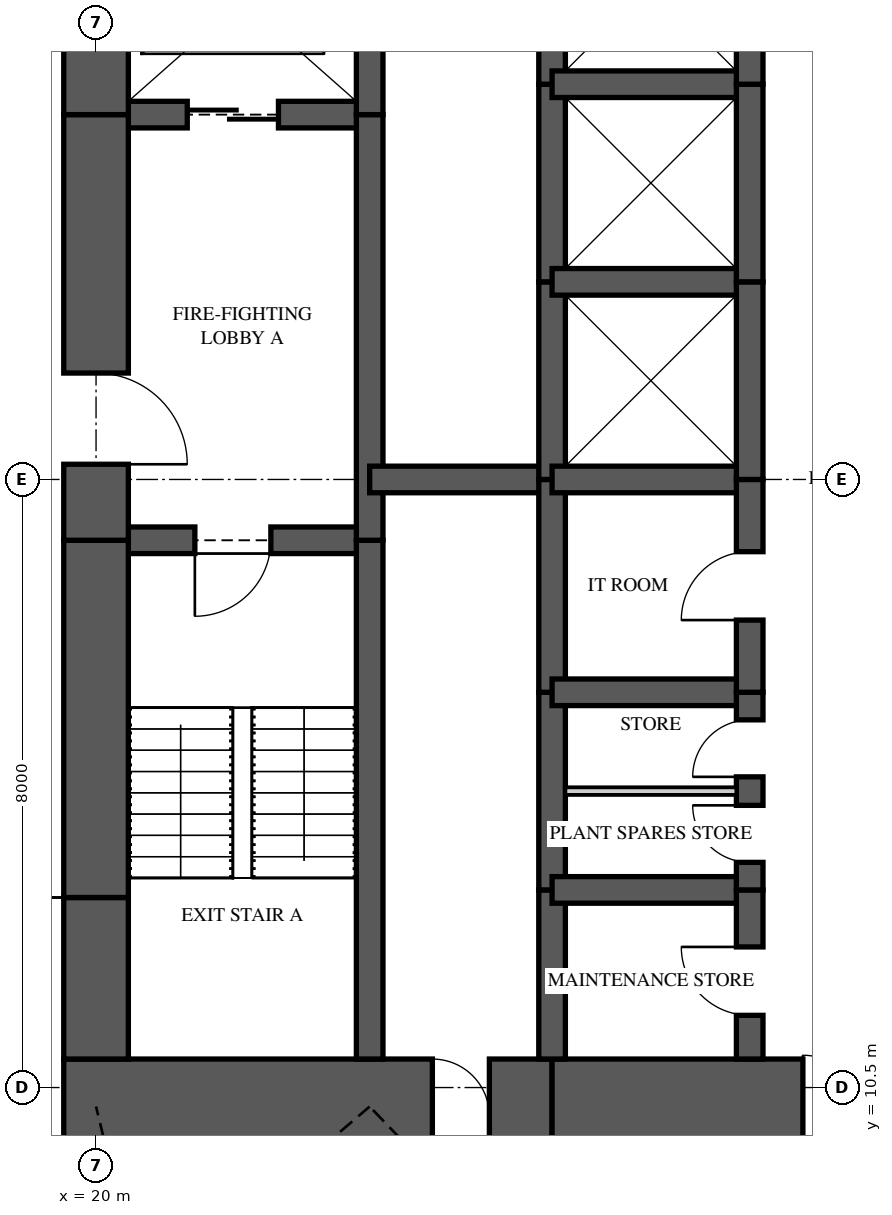
"""IFC4 building model, lengths in metres.
Left out: names, types, materials, properties, quantities, classifications, styles, units other than length and angle.
Written with IfcOpenShell. Run it as: python <this file> out.ifc"""

import sys

from ifc_helpers import new_model, si_unit, direction, frame, frame_2d, origin, place, context, subcontext, project, spatial, rectangle, extrude, element, fill, save


model = new_model("IFC4")
c1 = context("Model", 3, precision=1e-05, world=origin(), true_north=direction((0.0, 1.0)))
c2 = subcontext(c1, "Body", "Model", "MODEL_VIEW")
j1 = project(units=[si_unit("LENGTHUNIT", "METRE"), si_unit("PLANEANGLEUNIT", "RADIAN")], contexts=[c1])
p1 = place(None, origin())
s1 = spatial("IfcSite", under=j1, at=p1, CompositionType="ELEMENT")
p2 = place(p1, origin())
s2 = spatial("IfcBuilding", under=s1, at=p2, CompositionType="ELEMENT")
p3 = place(p2, frame((0.0, 0.0, 149.35)))
s3 = spatial("IfcBuildingStorey", under=s2, at=p3, CompositionType="ELEMENT", Elevation=149.35)
p4 = place(p3, frame((19.575, 10.125, 0.0), z_axis=(0.0, 0.0, 1.0), x_axis=(1.0, 0.0, 0.0)))
e1 = element("IfcWall", 1, at=p4, inside=s3, PredefinedType="SHEAR", context=c2, shape_type="SweptSolid", body=[
    extrude(rectangle(XDim=6.425, YDim=1.5, at=frame_2d((3.212, 0.0))), origin(), (0.0, 0.0, 1.0), 5.0),
])
p5 = place(p4, frame((4.85, 0.0, 0.0)))
e2 = element("IfcOpeningElement", 2, at=p5, cuts=e1, PredefinedType="OPENING", context=c2, shape_type="SweptSolid", body=[
    extrude(rectangle(XDim=0.75, YDim=2.1, at=frame_2d((0.375, 1.05))), frame((0.0, 0.76, 0.0), z_axis=(0.0, -1.0, 0.0), x_axis=(1.0, 0.0, 0.0)), (0.0, 0.0, 1.0), 1.52),
])
p6 = place(p3, frame((26.0, 10.125, 0.0), z_axis=(0.0, 0.0, 1.0), x_axis=(1.0, 0.0, 0.0)))
e3 = element("IfcWall", 3, at=p6, inside=s3, PredefinedType="SHEAR", context=c2, shape_type="SweptSolid", body=[
    extrude(rectangle(XDim=5.6, YDim=1.5, at=frame_2d((2.8, 0.0))), origin(), (0.0, 0.0, 1.0), 5.0),
])
p7 = place(p6, frame((3.3, 0.0, 0.0)))
e4 = element("IfcOpeningElement", 4, at=p7, cuts=e3, PredefinedType="OPENING", context=c2, shape_type="SweptSolid", body=[
    extrude(rectangle(XDim=1.6, YDim=2.1, at=frame_2d((0.8, 1.05))), frame((0.0, 0.76, 0.0), z_axis=(0.0, -1.0, 0.0), x_axis=(1.0, 0.0, 0.0)), (0.0, 0.0, 1.0), 1.52),
])
p8 = place(p3, frame((20.0, 26.125, 0.0), z_axis=(0.0, 0.0, 1.0), x_axis=(0.0, -1.0, 0.0)))
e5 = element("IfcWall", 5, at=p8, inside=s3, PredefinedType="SHEAR", context=c2, shape_type="SweptSolid", body=[
    extrude(rectangle(XDim=2.825, YDim=0.85, at=frame_2d((1.413, 0.0))), origin(), (0.0, 0.0, 1.0), 5.0),
])
p9 = place(p3, frame((20.0, 23.3, 0.0), z_axis=(0.0, 0.0, 1.0), x_axis=(0.0, -1.0, 0.0)))
e6 = element("IfcWall", 6, at=p9, inside=s3, PredefinedType="SHEAR", context=c2, shape_type="SweptSolid", body=[
    extrude(rectangle(XDim=5.6, YDim=0.85, at=frame_2d((2.8, 0.0))), origin(), (0.0, 0.0, 1.0), 5.0),
])
p10 = place(p9, frame((3.4, 0.0, 0.0)))
e7 = element("IfcOpeningElement", 7, at=p10, cuts=e6, PredefinedType="OPENING", context=c2, shape_type="SweptSolid", body=[
    extrude(rectangle(XDim=1.2, YDim=2.2, at=frame_2d((0.6, 1.1))), frame((0.0, 0.435, 0.0), z_axis=(0.0, -1.0, 0.0), x_axis=(1.0, 0.0, 0.0)), (0.0, 0.0, 1.0), 0.87),
])
p11 = place(p3, frame((20.0, 17.7, 0.0), z_axis=(0.0, 0.0, 1.0), x_axis=(0.0, -1.0, 0.0)))
e8 = element("IfcWall", 8, at=p11, inside=s3, PredefinedType="SHEAR", context=c2, shape_type="SweptSolid", body=[
    extrude(rectangle(XDim=4.7, YDim=0.85, at=frame_2d((2.35, 0.0))), origin(), (0.0, 0.0, 1.0), 5.0),
])
p12 = place(p3, frame((20.0, 13.0, 0.0), z_axis=(0.0, 0.0, 1.0), x_axis=(0.0, -1.0, 0.0)))
e9 = element("IfcWall", 9, at=p12, inside=s3, PredefinedType="SHEAR", context=c2, shape_type="SweptSolid", body=[
    extrude(rectangle(XDim=2.125, YDim=0.85, at=frame_2d((1.062, 0.0))), origin(), (0.0, 0.0, 1.0), 5.0),
])
p13 = place(p3, frame((23.6, 10.875, 0.0), z_axis=(0.0, 0.0, 1.0), x_axis=(0.0, 1.0, 0.0)))
e10 = element("IfcWall", 10, at=p13, inside=s3, PredefinedType="SHEAR", context=c2, shape_type="SweptSolid", body=[
    extrude(rectangle(XDim=6.825, YDim=0.35, at=frame_2d((3.413, 0.0))), origin(), (0.0, 0.0, 1.0), 5.0),
])
p14 = place(p3, frame((23.6, 17.7, 0.0), z_axis=(0.0, 0.0, 1.0), x_axis=(0.0, 1.0, 0.0)))
e11 = element("IfcWall", 11, at=p14, inside=s3, PredefinedType="SHEAR", context=c2, shape_type="SweptSolid", body=[
    extrude(rectangle(XDim=5.6, YDim=0.35, at=frame_2d((2.8, 0.0))), origin(), (0.0, 0.0, 1.0), 5.0),
])
p15 = place(p3, frame((23.6, 23.3, 0.0), z_axis=(0.0, 0.0, 1.0), x_axis=(0.0, 1.0, 0.0)))
e12 = element("IfcWall", 12, at=p15, inside=s3, PredefinedType="SHEAR", context=c2, shape_type="SweptSolid", body=[
    extrude(rectangle(XDim=2.825, YDim=0.35, at=frame_2d((1.413, 0.0))), origin(), (0.0, 0.0, 1.0), 5.0),
])
p16 = place(p3, frame((26.0, 10.875, 0.0), z_axis=(0.0, 0.0, 1.0), x_axis=(0.0, 1.0, 0.0)))
e13 = element("IfcWall", 13, at=p16, inside=s3, PredefinedType="SHEAR", context=c2, shape_type="SweptSolid", body=[
    extrude(rectangle(XDim=2.225, YDim=0.35, at=frame_2d((1.113, 0.0))), origin(), (0.0, 0.0, 1.0), 5.0),
])
p17 = place(p3, frame((26.0, 13.1, 0.0), z_axis=(0.0, 0.0, 1.0), x_axis=(0.0, 1.0, 0.0)))
e14 = element("IfcWall", 14, at=p17, inside=s3, PredefinedType="SHEAR", context=c2, shape_type="SweptSolid", body=[
    extrude(rectangle(XDim=2.6, YDim=0.35, at=frame_2d((1.3, 0.0))), origin(), (0.0, 0.0, 1.0), 5.0),
])
p18 = place(p3, frame((26.0, 15.7, 0.0), z_axis=(0.0, 0.0, 1.0), x_axis=(0.0, 1.0, 0.0)))
e15 = element("IfcWall", 15, at=p18, inside=s3, PredefinedType="SHEAR", context=c2, shape_type="SweptSolid", body=[
    extrude(rectangle(XDim=2.8, YDim=0.35, at=frame_2d((1.4, 0.0))), origin(), (0.0, 0.0, 1.0), 5.0),
])
p19 = place(p3, frame((26.0, 18.5, 0.0), z_axis=(0.0, 0.0, 1.0), x_axis=(0.0, 1.0, 0.0)))
e16 = element("IfcWall", 16, at=p19, inside=s3, PredefinedType="SHEAR", context=c2, shape_type="SweptSolid", body=[
    extrude(rectangle(XDim=2.6, YDim=0.35, at=frame_2d((1.3, 0.0))), origin(), (0.0, 0.0, 1.0), 5.0),
])
p20 = place(p3, frame((26.0, 21.1, 0.0), z_axis=(0.0, 0.0, 1.0), x_axis=(0.0, 1.0, 0.0)))
e17 = element("IfcWall", 17, at=p20, inside=s3, PredefinedType="SHEAR", context=c2, shape_type="SweptSolid", body=[
    extrude(rectangle(XDim=2.6, YDim=0.35, at=frame_2d((1.3, 0.0))), origin(), (0.0, 0.0, 1.0), 5.0),
])
p21 = place(p3, frame((26.0, 23.7, 0.0), z_axis=(0.0, 0.0, 1.0), x_axis=(0.0, 1.0, 0.0)))
e18 = element("IfcWall", 18, at=p21, inside=s3, PredefinedType="SHEAR", context=c2, shape_type="SweptSolid", body=[
    extrude(rectangle(XDim=2.425, YDim=0.35, at=frame_2d((1.212, 0.0))), origin(), (0.0, 0.0, 1.0), 5.0),
])
p22 = place(p3, frame((28.6, 10.875, 0.0), z_axis=(0.0, 0.0, 1.0), x_axis=(0.0, 1.0, 0.0)))
e19 = element("IfcWall", 19, at=p22, inside=s3, PredefinedType="SHEAR", context=c2, shape_type="SweptSolid", body=[
    extrude(rectangle(XDim=2.225, YDim=0.35, at=frame_2d((1.113, 0.0))), origin(), (0.0, 0.0, 1.0), 5.0),
])
p23 = place(p22, frame((0.575, 0.0, 0.0)))
e20 = element("IfcOpeningElement", 20, at=p23, cuts=e19, PredefinedType="OPENING", context=c2, shape_type="SweptSolid", body=[
    extrude(rectangle(XDim=0.9, YDim=2.1, at=frame_2d((0.45, 1.05))), frame((0.0, 0.185, 0.0), z_axis=(0.0, -1.0, 0.0), x_axis=(1.0, 0.0, 0.0)), (0.0, 0.0, 1.0), 0.37),
])
p24 = place(p3, frame((28.6, 13.1, 0.0), z_axis=(0.0, 0.0, 1.0), x_axis=(0.0, 1.0, 0.0)))
e21 = element("IfcWall", 21, at=p24, inside=s3, PredefinedType="SHEAR", context=c2, shape_type="SweptSolid", body=[
    extrude(rectangle(XDim=2.6, YDim=0.35, at=frame_2d((1.3, 0.0))), origin(), (0.0, 0.0, 1.0), 5.0),
])
p25 = place(p24, frame((0.363, 0.0, 0.0)))
e22 = element("IfcOpeningElement", 22, at=p25, cuts=e21, PredefinedType="OPENING", context=c2, shape_type="SweptSolid", body=[
    extrude(rectangle(XDim=0.75, YDim=2.1, at=frame_2d((0.375, 1.05))), frame((0.0, 0.185, 0.0), z_axis=(0.0, -1.0, 0.0), x_axis=(1.0, 0.0, 0.0)), (0.0, 0.0, 1.0), 0.37),
])
p26 = place(p24, frame((1.488, 0.0, 0.0)))
e23 = element("IfcOpeningElement", 23, at=p26, cuts=e21, PredefinedType="OPENING", context=c2, shape_type="SweptSolid", body=[
    extrude(rectangle(XDim=0.75, YDim=2.1, at=frame_2d((0.375, 1.05))), frame((0.0, 0.185, 0.0), z_axis=(0.0, -1.0, 0.0), x_axis=(1.0, 0.0, 0.0)), (0.0, 0.0, 1.0), 0.37),
])
p27 = place(p3, frame((28.6, 15.7, 0.0), z_axis=(0.0, 0.0, 1.0), x_axis=(0.0, 1.0, 0.0)))
e24 = element("IfcWall", 24, at=p27, inside=s3, PredefinedType="SHEAR", context=c2, shape_type="SweptSolid", body=[
    extrude(rectangle(XDim=2.8, YDim=0.35, at=frame_2d((1.4, 0.0))), origin(), (0.0, 0.0, 1.0), 5.0),
])
p28 = place(p27, frame((0.95, 0.0, 0.0)))
e25 = element("IfcOpeningElement", 25, at=p28, cuts=e24, PredefinedType="OPENING", context=c2, shape_type="SweptSolid", body=[
    extrude(rectangle(XDim=0.9, YDim=2.1, at=frame_2d((0.45, 1.05))), frame((0.0, 0.185, 0.0), z_axis=(0.0, -1.0, 0.0), x_axis=(1.0, 0.0, 0.0)), (0.0, 0.0, 1.0), 0.37),
])
p29 = place(p3, frame((28.6, 18.5, 0.0), z_axis=(0.0, 0.0, 1.0), x_axis=(0.0, 1.0, 0.0)))
e26 = element("IfcWall", 26, at=p29, inside=s3, PredefinedType="SHEAR", context=c2, shape_type="SweptSolid", body=[
    extrude(rectangle(XDim=2.6, YDim=0.35, at=frame_2d((1.3, 0.0))), origin(), (0.0, 0.0, 1.0), 5.0),
])
p30 = place(p3, frame((28.6, 21.1, 0.0), z_axis=(0.0, 0.0, 1.0), x_axis=(0.0, 1.0, 0.0)))
e27 = element("IfcWall", 27, at=p30, inside=s3, PredefinedType="SHEAR", context=c2, shape_type="SweptSolid", body=[
    extrude(rectangle(XDim=2.6, YDim=0.35, at=frame_2d((1.3, 0.0))), origin(), (0.0, 0.0, 1.0), 5.0),
])
p31 = place(p3, frame((28.6, 23.7, 0.0), z_axis=(0.0, 0.0, 1.0), x_axis=(0.0, 1.0, 0.0)))
e28 = element("IfcWall", 28, at=p31, inside=s3, PredefinedType="SHEAR", context=c2, shape_type="SweptSolid", body=[
    extrude(rectangle(XDim=2.425, YDim=0.35, at=frame_2d((1.212, 0.0))), origin(), (0.0, 0.0, 1.0), 5.0),
])
p32 = place(p3, frame((20.0, 17.7, 0.0), z_axis=(0.0, 0.0, 1.0), x_axis=(1.0, 0.0, 0.0)))
e29 = element("IfcWall", 29, at=p32, inside=s3, PredefinedType="SHEAR", context=c2, shape_type="SweptSolid", body=[
    extrude(rectangle(XDim=3.6, YDim=0.35, at=frame_2d((1.8, 0.0))), origin(), (0.0, 0.0, 1.0), 5.0),
])
p33 = place(p32, frame((1.3, 0.0, 0.0)))
e30 = element("IfcOpeningElement", 30, at=p33, cuts=e29, PredefinedType="OPENING", context=c2, shape_type="SweptSolid", body=[
    extrude(rectangle(XDim=1.0, YDim=2.1, at=frame_2d((0.5, 1.05))), frame((0.0, 0.185, 0.0), z_axis=(0.0, -1.0, 0.0), x_axis=(1.0, 0.0, 0.0)), (0.0, 0.0, 1.0), 0.37),
])
p34 = place(p3, frame((20.0, 23.3, 0.0), z_axis=(0.0, 0.0, 1.0), x_axis=(1.0, 0.0, 0.0)))
e31 = element("IfcWall", 31, at=p34, inside=s3, PredefinedType="SHEAR", context=c2, shape_type="SweptSolid", body=[
    extrude(rectangle(XDim=3.6, YDim=0.35, at=frame_2d((1.8, 0.0))), origin(), (0.0, 0.0, 1.0), 5.0),
])
p35 = place(p34, frame((1.2, 0.0, 0.0)))
e32 = element("IfcOpeningElement", 32, at=p35, cuts=e31, PredefinedType="OPENING", context=c2, shape_type="SweptSolid", body=[
    extrude(rectangle(XDim=1.2, YDim=2.1, at=frame_2d((0.6, 1.05))), frame((0.0, 0.185, 0.0), z_axis=(0.0, -1.0, 0.0), x_axis=(1.0, 0.0, 0.0)), (0.0, 0.0, 1.0), 0.37),
])
p36 = place(p3, frame((23.6, 18.5, 0.0), z_axis=(0.0, 0.0, 1.0), x_axis=(1.0, 0.0, 0.0)))
e33 = element("IfcWall", 33, at=p36, inside=s3, PredefinedType="SHEAR", context=c2, shape_type="SweptSolid", body=[
    extrude(rectangle(XDim=2.4, YDim=0.35, at=frame_2d((1.2, 0.0))), origin(), (0.0, 0.0, 1.0), 5.0),
])
for number, where, z_axis, x_axis in (
    (34, (26.0, 13.1, 0.0), (0.0, 0.0, 1.0), (1.0, 0.0, 0.0)),
    (35, (26.0, 15.7, 0.0), (0.0, 0.0, 1.0), (1.0, 0.0, 0.0)),
    (36, (26.0, 18.5, 0.0), (0.0, 0.0, 1.0), (1.0, 0.0, 0.0)),
    (37, (26.0, 21.1, 0.0), (0.0, 0.0, 1.0), (1.0, 0.0, 0.0)),
    (38, (26.0, 23.7, 0.0), (0.0, 0.0, 1.0), (1.0, 0.0, 0.0)),
):
    element("IfcWall", number, at=place(p3, frame(where, z_axis=z_axis, x_axis=x_axis)), inside=s3, PredefinedType="SHEAR", context=c2, shape_type="SweptSolid", body=[
        extrude(rectangle(XDim=2.6, YDim=0.35, at=frame_2d((1.3, 0.0))), origin(), (0.0, 0.0, 1.0), 5.0),
    ])
p37 = place(p3, frame((26.175, 14.4, 0.0), z_axis=(0.0, 0.0, 1.0), x_axis=(1.0, 0.0, 0.0)))
e39 = element("IfcWall", 39, at=p37, inside=s3, PredefinedType="PARTITIONING", context=c2, shape_type="SweptSolid", body=[
    extrude(rectangle(XDim=2.25, YDim=0.1, at=frame_2d((1.125, 0.0))), origin(), (0.0, 0.0, 1.0), 4.72),
])
p38 = place(p33, frame((1.0, 0.0, 0.0), z_axis=(0.0, 0.0, 1.0), x_axis=(-1.0, 0.0, 0.0)))
e40 = element("IfcDoor", 40, at=p38, inside=s3, OperationType="SINGLE_SWING_RIGHT", PredefinedType="DOOR", context=c2, shape_type="SweptSolid", body=[
    extrude(rectangle(XDim=1.0, YDim=2.1, at=frame_2d((0.5, 1.05))), frame((0.0, 0.025, 0.0), z_axis=(0.0, -1.0, 0.0), x_axis=(1.0, 0.0, 0.0)), (0.0, 0.0, 1.0), 0.05),
])
fill(e30, e40)
p39 = place(p10, origin())
e41 = element("IfcDoor", 41, at=p39, inside=s3, OperationType="SINGLE_SWING_RIGHT", PredefinedType="DOOR", context=c2, shape_type="SweptSolid", body=[
    extrude(rectangle(XDim=1.2, YDim=2.2, at=frame_2d((0.6, 1.1))), frame((0.0, 0.025, 0.0), z_axis=(0.0, -1.0, 0.0), x_axis=(1.0, 0.0, 0.0)), (0.0, 0.0, 1.0), 0.05),
])
fill(e7, e41)
p40 = place(p35, origin())
e42 = element("IfcDoor", 42, at=p40, inside=s3, OperationType="SLIDING_TO_LEFT", PredefinedType="DOOR", context=c2, shape_type="SweptSolid", body=[
    extrude(rectangle(XDim=1.2, YDim=2.1, at=frame_2d((0.6, 1.05))), frame((0.0, 0.025, 0.0), z_axis=(0.0, -1.0, 0.0), x_axis=(1.0, 0.0, 0.0)), (0.0, 0.0, 1.0), 0.05),
])
fill(e32, e42)
p41 = place(p23, origin())
e43 = element("IfcDoor", 43, at=p41, inside=s3, OperationType="SINGLE_SWING_RIGHT", PredefinedType="DOOR", context=c2, shape_type="SweptSolid", body=[
    extrude(rectangle(XDim=0.9, YDim=2.1, at=frame_2d((0.45, 1.05))), frame((0.0, 0.025, 0.0), z_axis=(0.0, -1.0, 0.0), x_axis=(1.0, 0.0, 0.0)), (0.0, 0.0, 1.0), 0.05),
])
fill(e20, e43)
p42 = place(p25, origin())
e44 = element("IfcDoor", 44, at=p42, inside=s3, OperationType="SINGLE_SWING_RIGHT", PredefinedType="DOOR", context=c2, shape_type="SweptSolid", body=[
    extrude(rectangle(XDim=0.75, YDim=2.1, at=frame_2d((0.375, 1.05))), frame((0.0, 0.025, 0.0), z_axis=(0.0, -1.0, 0.0), x_axis=(1.0, 0.0, 0.0)), (0.0, 0.0, 1.0), 0.05),
])
fill(e22, e44)
p43 = place(p26, origin())
e45 = element("IfcDoor", 45, at=p43, inside=s3, OperationType="SINGLE_SWING_LEFT", PredefinedType="DOOR", context=c2, shape_type="SweptSolid", body=[
    extrude(rectangle(XDim=0.75, YDim=2.1, at=frame_2d((0.375, 1.05))), frame((0.0, 0.025, 0.0), z_axis=(0.0, -1.0, 0.0), x_axis=(1.0, 0.0, 0.0)), (0.0, 0.0, 1.0), 0.05),
])
fill(e23, e45)
p44 = place(p28, origin())
e46 = element("IfcDoor", 46, at=p44, inside=s3, OperationType="SINGLE_SWING_LEFT", PredefinedType="DOOR", context=c2, shape_type="SweptSolid", body=[
    extrude(rectangle(XDim=0.9, YDim=2.1, at=frame_2d((0.45, 1.05))), frame((0.0, 0.025, 0.0), z_axis=(0.0, -1.0, 0.0), x_axis=(1.0, 0.0, 0.0)), (0.0, 0.0, 1.0), 0.05),
])
fill(e25, e46)
p45 = place(p7, origin())
e47 = element("IfcDoor", 47, at=p45, inside=s3, OperationType="DOUBLE_DOOR_SINGLE_SWING", PredefinedType="DOOR", context=c2, shape_type="SweptSolid", body=[
    extrude(rectangle(XDim=1.6, YDim=2.1, at=frame_2d((0.8, 1.05))), frame((0.0, 0.025, 0.0), z_axis=(0.0, -1.0, 0.0), x_axis=(1.0, 0.0, 0.0)), (0.0, 0.0, 1.0), 0.05),
])
fill(e4, e47)
p46 = place(p5, origin())
e48 = element("IfcDoor", 48, at=p46, inside=s3, OperationType="SINGLE_SWING_LEFT", PredefinedType="DOOR", context=c2, shape_type="SweptSolid", body=[
    extrude(rectangle(XDim=0.75, YDim=2.1, at=frame_2d((0.375, 1.05))), frame((0.0, 0.025, 0.0), z_axis=(0.0, -1.0, 0.0), x_axis=(1.0, 0.0, 0.0)), (0.0, 0.0, 1.0), 0.05),
])
fill(e2, e48)
save(model, sys.argv[1])
